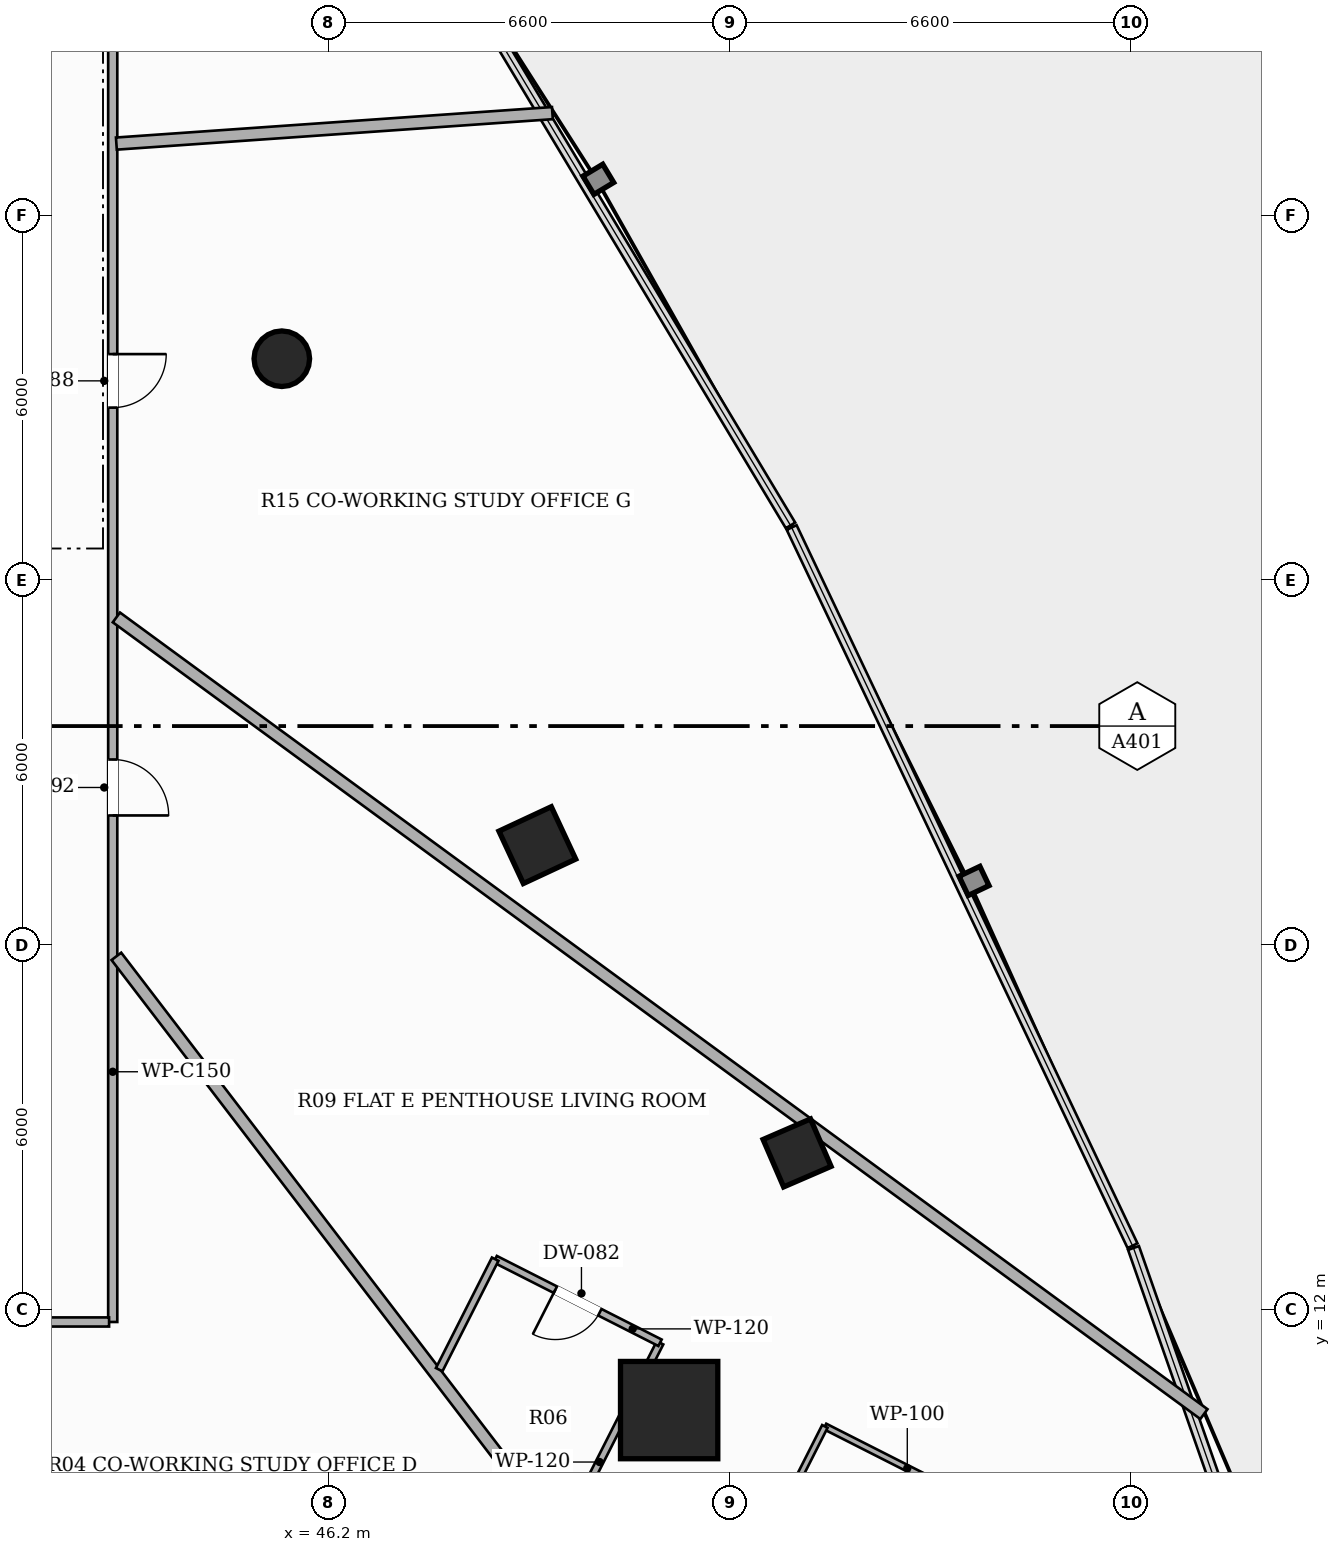
"""IFC4 building model, lengths in metres.
Left out: names, types, materials, properties, quantities, classifications, styles, units other than length and angle.
Written with IfcOpenShell. Run it as: python <this file> out.ifc"""

import sys

from ifc_helpers import new_model, si_unit, direction, frame, frame_2d, origin, origin_2d, place, context, subcontext, project, spatial, rectangle, hollow_rectangle, hollow_circle, extrude, element, fill, save


model = new_model("IFC4")
c1 = context("Model", 3, precision=1e-05, world=origin(), true_north=direction((0.0, 1.0)))
c2 = subcontext(c1, "Body", "Model", "MODEL_VIEW")
j1 = project(units=[si_unit("LENGTHUNIT", "METRE"), si_unit("PLANEANGLEUNIT", "RADIAN")], contexts=[c1])
p1 = place(None, origin())
s1 = spatial("IfcSite", under=j1, at=p1, CompositionType="ELEMENT")
p2 = place(p1, origin())
s2 = spatial("IfcBuilding", under=s1, at=p2, CompositionType="ELEMENT")
p3 = place(p2, frame((0.0, 0.0, 23.6)))
s3 = spatial("IfcBuildingStorey", under=s2, at=p3, CompositionType="ELEMENT", Elevation=23.6)
p4 = place(p3, frame((51.801, 10.351, 0.0), z_axis=(0.0, 0.0, 1.0), x_axis=(1.0, 0.0, 0.0)))
e1 = element("IfcColumn", 1, at=p4, inside=s3, PredefinedType="COLUMN", context=c2, shape_type="SweptSolid", body=[
    extrude(hollow_rectangle(XDim=1.6, YDim=1.6, WallThickness=0.05, at=origin_2d()), origin(), (0.0, 0.0, 1.0), 3.3),
])
p5 = place(p3, frame((49.633, 19.642, 0.0), z_axis=(0.0, 0.0, 1.0), x_axis=(-0.422618261741, 0.906307787037, 0.0)))
e2 = element("IfcColumn", 2, at=p5, inside=s3, PredefinedType="COLUMN", context=c2, shape_type="SweptSolid", body=[
    extrude(hollow_rectangle(XDim=0.95, YDim=0.95, WallThickness=0.032, at=origin_2d()), origin(), (0.0, 0.0, 1.0), 3.3),
])
p6 = place(p3, frame((45.431, 27.641, 0.0), z_axis=(0.0, 0.0, 1.0), x_axis=(1.0, 0.0, 0.0)))
e3 = element("IfcColumn", 3, at=p6, inside=s3, PredefinedType="COLUMN", context=c2, shape_type="SweptSolid", body=[
    extrude(hollow_circle(Radius=0.457, WallThickness=0.025, at=origin_2d()), origin(), (0.0, 0.0, 1.0), 3.3),
])
p7 = place(p3, frame((53.905, 14.58, 0.0), z_axis=(0.0, 0.0, 1.0), x_axis=(-0.397147890635, 0.917754625684, 0.0)))
e4 = element("IfcColumn", 4, at=p7, inside=s3, PredefinedType="COLUMN", context=c2, shape_type="SweptSolid", body=[
    extrude(hollow_rectangle(XDim=0.85, YDim=0.85, WallThickness=0.028, at=origin_2d()), origin(), (0.0, 0.0, 1.0), 3.3),
])
p8 = place(p3, frame((42.65, 36.84, 0.0), z_axis=(0.0, 0.0, 1.0), x_axis=(0.0, -1.0, 0.0)))
e5 = element("IfcWall", 5, at=p8, inside=s3, PredefinedType="PARTITIONING", context=c2, shape_type="SweptSolid", body=[
    extrude(rectangle(XDim=25.04, YDim=0.15, at=frame_2d((12.52, 0.0))), origin(), (0.0, 0.0, 1.0), 2.413),
])
p9 = place(p8, frame((2.543, 0.0, 0.0)))
e6 = element("IfcOpeningElement", 6, at=p9, cuts=e5, PredefinedType="OPENING", context=c2, shape_type="SweptSolid", body=[
    extrude(rectangle(XDim=0.88, YDim=2.1, at=frame_2d((0.44, 1.05))), frame((0.0, 0.085, 0.0), z_axis=(0.0, -1.0, 0.0), x_axis=(1.0, 0.0, 0.0)), (0.0, 0.0, 1.0), 0.17),
])
p10 = place(p8, frame((15.79, 0.0, 0.0)))
e7 = element("IfcOpeningElement", 7, at=p10, cuts=e5, PredefinedType="OPENING", context=c2, shape_type="SweptSolid", body=[
    extrude(rectangle(XDim=0.92, YDim=2.15, at=frame_2d((0.46, 1.075))), frame((0.0, 0.085, 0.0), z_axis=(0.0, -1.0, 0.0), x_axis=(1.0, 0.0, 0.0)), (0.0, 0.0, 1.0), 0.17),
])
p11 = place(p8, frame((9.123, 0.0, 0.0)))
e8 = element("IfcOpeningElement", 8, at=p11, cuts=e5, PredefinedType="OPENING", context=c2, shape_type="SweptSolid", body=[
    extrude(rectangle(XDim=0.88, YDim=2.1, at=frame_2d((0.44, 1.05))), frame((0.0, 0.085, 0.0), z_axis=(0.0, -1.0, 0.0), x_axis=(1.0, 0.0, 0.0)), (0.0, 0.0, 1.0), 0.17),
])
p12 = place(p3, frame((42.59, 11.8, 0.0), z_axis=(0.0, 0.0, 1.0), x_axis=(-1.0, 0.0, 0.0)))
e9 = element("IfcWall", 9, at=p12, inside=s3, PredefinedType="PARTITIONING", context=c2, shape_type="SweptSolid", body=[
    extrude(rectangle(XDim=19.24, YDim=0.15, at=frame_2d((9.62, 0.0))), origin(), (0.0, 0.0, 1.0), 2.669),
])
p13 = place(p12, frame((12.838, 0.0, 0.0)))
e10 = element("IfcOpeningElement", 10, at=p13, cuts=e9, PredefinedType="OPENING", context=c2, shape_type="SweptSolid", body=[
    extrude(rectangle(XDim=0.88, YDim=2.1, at=frame_2d((0.44, 1.05))), frame((0.0, 0.085, 0.0), z_axis=(0.0, -1.0, 0.0), x_axis=(1.0, 0.0, 0.0)), (0.0, 0.0, 1.0), 0.17),
])
p14 = place(p12, frame((3.519, 0.0, 0.0)))
e11 = element("IfcOpeningElement", 11, at=p14, cuts=e9, PredefinedType="OPENING", context=c2, shape_type="SweptSolid", body=[
    extrude(rectangle(XDim=0.88, YDim=2.1, at=frame_2d((0.44, 1.05))), frame((0.0, 0.085, 0.0), z_axis=(0.0, -1.0, 0.0), x_axis=(1.0, 0.0, 0.0)), (0.0, 0.0, 1.0), 0.17),
])
p15 = place(p3, frame((49.881, 31.68, 0.0), z_axis=(0.0, 0.0, 1.0), x_axis=(-0.997568680722, -0.069690223431, 0.0)))
e12 = element("IfcWall", 12, at=p15, inside=s3, PredefinedType="PARTITIONING", context=c2, shape_type="SweptSolid", body=[
    extrude(rectangle(XDim=7.189, YDim=0.2, at=frame_2d((3.594, 0.0))), origin(), (0.0, 0.0, 1.0), 2.413),
])
p16 = place(p3, frame((42.71, 17.813, 0.0), z_axis=(0.0, 0.0, 1.0), x_axis=(0.607788570878, -0.794098893784, 0.0)))
e13 = element("IfcWall", 13, at=p16, inside=s3, PredefinedType="PARTITIONING", context=c2, shape_type="SweptSolid", body=[
    extrude(rectangle(XDim=19.114, YDim=0.2, at=frame_2d((9.557, 0.0))), origin(), (0.0, 0.0, 1.0), 2.413),
])
p17 = place(p3, frame((42.71, 23.387, 0.0), z_axis=(0.0, 0.0, 1.0), x_axis=(0.806713303584, -0.590943014021, 0.0)))
e14 = element("IfcWall", 14, at=p17, inside=s3, PredefinedType="PARTITIONING", context=c2, shape_type="SweptSolid", body=[
    extrude(rectangle(XDim=22.171, YDim=0.2, at=frame_2d((11.086, 0.0))), origin(), (0.0, 0.0, 1.0), 2.413),
])
p18 = place(p3, frame((50.069, 8.338, 0.0), z_axis=(0.0, 0.0, 1.0), x_axis=(0.45217581214, 0.891928828391, 0.0)))
e15 = element("IfcWall", 15, at=p18, inside=s3, PredefinedType="PARTITIONING", context=c2, shape_type="SweptSolid", body=[
    extrude(rectangle(XDim=3.498, YDim=0.12, at=frame_2d((1.749, 0.0))), origin(), (0.0, 0.0, 1.0), 2.413),
])
p19 = place(p3, frame((51.651, 11.458, 0.0), z_axis=(0.0, 0.0, 1.0), x_axis=(-0.891842269509, 0.452346511336, 0.0)))
e16 = element("IfcWall", 16, at=p19, inside=s3, PredefinedType="PARTITIONING", context=c2, shape_type="SweptSolid", body=[
    extrude(rectangle(XDim=3.04, YDim=0.12, at=frame_2d((1.52, 0.0))), origin(), (0.0, 0.0, 1.0), 2.413),
])
p20 = place(p19, frame((1.11, 0.0, 0.0)))
e17 = element("IfcOpeningElement", 17, at=p20, cuts=e16, PredefinedType="OPENING", context=c2, shape_type="SweptSolid", body=[
    extrude(rectangle(XDim=0.82, YDim=2.1, at=frame_2d((0.41, 1.05))), frame((0.0, 0.07, 0.0), z_axis=(0.0, -1.0, 0.0), x_axis=(1.0, 0.0, 0.0)), (0.0, 0.0, 1.0), 0.14),
])
p21 = place(p3, frame((48.94, 12.833, 0.0), z_axis=(0.0, 0.0, 1.0), x_axis=(-0.452097038501, -0.891968759418, 0.0)))
e18 = element("IfcWall", 18, at=p21, inside=s3, PredefinedType="PARTITIONING", context=c2, shape_type="SweptSolid", body=[
    extrude(rectangle(XDim=2.037, YDim=0.12, at=frame_2d((1.019, 0.0))), origin(), (0.0, 0.0, 1.0), 3.06),
])
p22 = place(p3, frame((57.073, 8.708, 0.0), z_axis=(0.0, 0.0, 1.0), x_axis=(-0.891842269509, 0.452346511336, 0.0)))
e19 = element("IfcWall", 19, at=p22, inside=s3, PredefinedType="PARTITIONING", context=c2, shape_type="SweptSolid", body=[
    extrude(rectangle(XDim=3.04, YDim=0.1, at=frame_2d((1.52, 0.0))), origin(), (0.0, 0.0, 1.0), 2.619),
])
p23 = place(p3, frame((54.362, 10.083, 0.0), z_axis=(0.0, 0.0, 1.0), x_axis=(-0.452306340277, -0.891862643317, 0.0)))
e20 = element("IfcWall", 20, at=p23, inside=s3, PredefinedType="PARTITIONING", context=c2, shape_type="SweptSolid", body=[
    extrude(rectangle(XDim=4.959, YDim=0.1, at=frame_2d((2.48, 0.0))), origin(), (0.0, 0.0, 1.0), 3.06),
])
p24 = place(p23, frame((2.04, 0.0, 0.0)))
e21 = element("IfcOpeningElement", 21, at=p24, cuts=e20, PredefinedType="OPENING", context=c2, shape_type="SweptSolid", body=[
    extrude(rectangle(XDim=0.88, YDim=2.1, at=frame_2d((0.44, 1.05))), frame((0.0, 0.06, 0.0), z_axis=(0.0, -1.0, 0.0), x_axis=(1.0, 0.0, 0.0)), (0.0, 0.0, 1.0), 0.12),
])
p25 = place(p10, origin())
e22 = element("IfcDoor", 22, at=p25, inside=s3, OperationType="SINGLE_SWING_RIGHT", PredefinedType="DOOR", context=c2, shape_type="SweptSolid", body=[
    extrude(rectangle(XDim=0.92, YDim=2.15, at=frame_2d((0.46, 1.075))), frame((0.0, 0.025, 0.0), z_axis=(0.0, -1.0, 0.0), x_axis=(1.0, 0.0, 0.0)), (0.0, 0.0, 1.0), 0.05),
])
fill(e7, e22)
p26 = place(p20, origin())
e23 = element("IfcDoor", 23, at=p26, inside=s3, OperationType="SINGLE_SWING_RIGHT", PredefinedType="DOOR", context=c2, shape_type="SweptSolid", body=[
    extrude(rectangle(XDim=0.82, YDim=2.1, at=frame_2d((0.41, 1.05))), frame((0.0, 0.025, 0.0), z_axis=(0.0, -1.0, 0.0), x_axis=(1.0, 0.0, 0.0)), (0.0, 0.0, 1.0), 0.05),
])
fill(e17, e23)
p27 = place(p11, origin())
e24 = element("IfcDoor", 24, at=p27, inside=s3, OperationType="SINGLE_SWING_LEFT", PredefinedType="DOOR", context=c2, shape_type="SweptSolid", body=[
    extrude(rectangle(XDim=0.88, YDim=2.1, at=frame_2d((0.44, 1.05))), frame((0.0, 0.025, 0.0), z_axis=(0.0, -1.0, 0.0), x_axis=(1.0, 0.0, 0.0)), (0.0, 0.0, 1.0), 0.05),
])
fill(e8, e24)
save(model, sys.argv[1])
